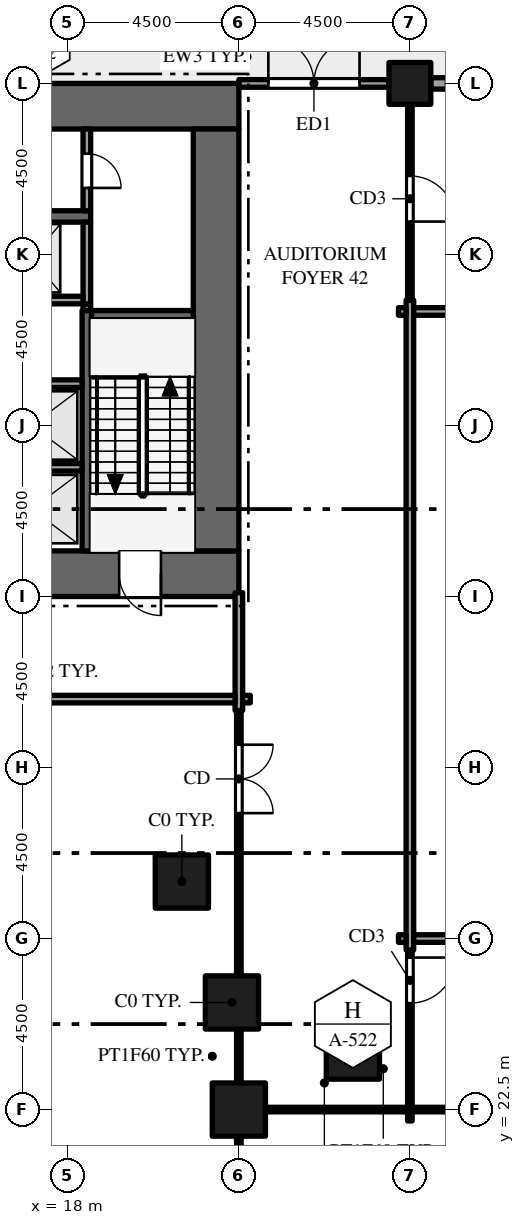
"""IFC4 building model, lengths in metres.
Left out: names, types, materials, properties, quantities, classifications, styles, units other than length and angle.
Written with IfcOpenShell. Run it as: python <this file> out.ifc"""

import sys

from ifc_helpers import new_model, si_unit, direction, frame, frame_2d, origin, origin_2d, place, context, subcontext, project, spatial, rectangle, hollow_rectangle, extrude, element, fill, save


model = new_model("IFC4")
c1 = context("Model", 3, precision=1e-05, world=origin(), true_north=direction((0.0, 1.0)))
c2 = subcontext(c1, "Body", "Model", "MODEL_VIEW")
j1 = project(units=[si_unit("LENGTHUNIT", "METRE"), si_unit("PLANEANGLEUNIT", "RADIAN")], contexts=[c1])
p1 = place(None, origin())
s1 = spatial("IfcSite", under=j1, at=p1, CompositionType="ELEMENT")
p2 = place(p1, origin())
s2 = spatial("IfcBuilding", under=s1, at=p2, CompositionType="ELEMENT")
p3 = place(p2, origin())
s3 = spatial("IfcBuildingStorey", under=s2, at=p3, CompositionType="ELEMENT", Elevation=0.0)
p4 = place(p3, frame((0.0, 36.6, -0.3), z_axis=(0.0, 0.0, 1.0), x_axis=(1.0, 0.0, 0.0)))
e1 = element("IfcWall", 1, at=p4, inside=s3, PredefinedType="SHEAR", context=c2, shape_type="SweptSolid", body=[
    extrude(rectangle(XDim=22.5, YDim=1.2, at=frame_2d((11.25, 0.0))), origin(), (0.0, 0.0, 1.0), 8.15),
])
p5 = place(p4, frame((7.1, 0.0, 0.3)))
e2 = element("IfcOpeningElement", 2, at=p5, cuts=e1, PredefinedType="OPENING", context=c2, shape_type="SweptSolid", body=[
    extrude(rectangle(XDim=1.8, YDim=2.1, at=frame_2d((0.9, 1.05))), frame((0.0, 0.61, 0.0), z_axis=(0.0, -1.0, 0.0), x_axis=(1.0, 0.0, 0.0)), (0.0, 0.0, 1.0), 1.22),
])
p6 = place(p4, frame((13.15, 0.0, 0.3)))
e3 = element("IfcOpeningElement", 3, at=p6, cuts=e1, PredefinedType="OPENING", context=c2, shape_type="SweptSolid", body=[
    extrude(rectangle(XDim=1.1, YDim=2.1, at=frame_2d((0.55, 1.05))), frame((0.0, 0.61, 0.0), z_axis=(0.0, -1.0, 0.0), x_axis=(1.0, 0.0, 0.0)), (0.0, 0.0, 1.0), 1.22),
])
p7 = place(p4, frame((2.15, 0.0, 0.3)))
e4 = element("IfcOpeningElement", 4, at=p7, cuts=e1, PredefinedType="OPENING", context=c2, shape_type="SweptSolid", body=[
    extrude(rectangle(XDim=1.1, YDim=2.1, at=frame_2d((0.55, 1.05))), frame((0.0, 0.61, 0.0), z_axis=(0.0, -1.0, 0.0), x_axis=(1.0, 0.0, 0.0)), (0.0, 0.0, 1.0), 1.22),
])
p8 = place(p4, frame((19.35, 0.0, 0.3)))
e5 = element("IfcOpeningElement", 5, at=p8, cuts=e1, PredefinedType="OPENING", context=c2, shape_type="SweptSolid", body=[
    extrude(rectangle(XDim=1.1, YDim=2.1, at=frame_2d((0.55, 1.05))), frame((0.0, 0.61, 0.0), z_axis=(0.0, -1.0, 0.0), x_axis=(1.0, 0.0, 0.0)), (0.0, 0.0, 1.0), 1.22),
])
p9 = place(p3, frame((0.0, 48.9, -0.3), z_axis=(0.0, 0.0, 1.0), x_axis=(1.0, 0.0, 0.0)))
e6 = element("IfcWall", 6, at=p9, inside=s3, PredefinedType="SHEAR", context=c2, shape_type="SweptSolid", body=[
    extrude(rectangle(XDim=22.5, YDim=1.2, at=frame_2d((11.25, 0.0))), origin(), (0.0, 0.0, 1.0), 8.15),
])
p10 = place(p3, frame((21.9, 37.2, -0.3), z_axis=(0.0, 0.0, 1.0), x_axis=(0.0, 1.0, 0.0)))
e7 = element("IfcWall", 7, at=p10, inside=s3, PredefinedType="SHEAR", context=c2, shape_type="SweptSolid", body=[
    extrude(rectangle(XDim=11.1, YDim=1.2, at=frame_2d((5.55, 0.0))), origin(), (0.0, 0.0, 1.0), 8.15),
])
for number, where, z_axis, x_axis in (
    (8, (21.0, 28.5, -0.3), (0.0, 0.0, 1.0), (1.0, 0.0, 0.0)),
    (9, (22.318, 25.318, -0.3), (0.0, 0.0, 1.0), (1.0, 0.0, 0.0)),
    (10, (22.5, 22.5, -0.3), (0.0, 0.0, 1.0), (1.0, 0.0, 0.0)),
    (11, (25.5, 24.0, -0.3), (0.0, 0.0, 1.0), (1.0, 0.0, 0.0)),
):
    element("IfcColumn", number, at=place(p3, frame(where, z_axis=z_axis, x_axis=x_axis)), inside=s3, PredefinedType="COLUMN", context=c2, shape_type="SweptSolid", body=[
        extrude(hollow_rectangle(XDim=1.4, YDim=1.4, WallThickness=0.08, at=origin_2d()), origin(), (0.0, 0.0, 1.0), 8.05),
    ])
p11 = place(p3, frame((27.0, 49.5, -0.3), z_axis=(0.0, 0.0, 1.0), x_axis=(1.0, 0.0, 0.0)))
e12 = element("IfcColumn", 12, at=p11, inside=s3, PredefinedType="COLUMN", context=c2, shape_type="SweptSolid", body=[
    extrude(hollow_rectangle(XDim=1.1, YDim=1.1, WallThickness=0.06, at=origin_2d()), origin(), (0.0, 0.0, 1.0), 8.05),
])
p12 = place(p3, frame((30.95, 49.5, 0.0), z_axis=(0.0, 0.0, 1.0), x_axis=(-1.0, 0.0, 0.0)))
e13 = element("IfcWall", 13, at=p12, inside=s3, PredefinedType="STANDARD", context=c2, shape_type="SweptSolid", body=[
    extrude(rectangle(XDim=3.4, YDim=0.3, at=frame_2d((1.7, 0.0))), origin(), (0.0, 0.0, 1.0), 7.036),
])
p13 = place(p12, frame((0.4, 0.0, 0.9)))
e14 = element("IfcOpeningElement", 14, at=p13, cuts=e13, PredefinedType="OPENING", context=c2, shape_type="SweptSolid", body=[
    extrude(rectangle(XDim=1.0, YDim=3.5, at=frame_2d((0.5, 1.75))), frame((0.0, 0.16, 0.0), z_axis=(0.0, -1.0, 0.0), x_axis=(1.0, 0.0, 0.0)), (0.0, 0.0, 1.0), 0.32),
])
p14 = place(p12, frame((2.0, 0.0, 0.9)))
e15 = element("IfcOpeningElement", 15, at=p14, cuts=e13, PredefinedType="OPENING", context=c2, shape_type="SweptSolid", body=[
    extrude(rectangle(XDim=1.0, YDim=3.5, at=frame_2d((0.5, 1.75))), frame((0.0, 0.16, 0.0), z_axis=(0.0, -1.0, 0.0), x_axis=(1.0, 0.0, 0.0)), (0.0, 0.0, 1.0), 0.32),
])
p15 = place(p3, frame((22.501, 49.5, 0.0), z_axis=(0.0, 0.0, 1.0), x_axis=(1.0, 0.0, 0.0)))
e16 = element("IfcWall", 16, at=p15, inside=s3, PredefinedType="STANDARD", context=c2, shape_type="SweptSolid", body=[
    extrude(rectangle(XDim=3.949, YDim=0.2, at=frame_2d((1.975, 0.0))), origin(), (0.0, 0.0, 1.0), 7.036),
])
p16 = place(p15, frame((0.774, 0.0, 0.0)))
e17 = element("IfcOpeningElement", 17, at=p16, cuts=e16, PredefinedType="OPENING", context=c2, shape_type="SweptSolid", body=[
    extrude(rectangle(XDim=2.4, YDim=3.0, at=frame_2d((1.2, 1.5))), frame((0.0, 0.11, 0.0), z_axis=(0.0, -1.0, 0.0), x_axis=(1.0, 0.0, 0.0)), (0.0, 0.0, 1.0), 0.22),
])
p17 = place(p3, frame((18.5, 37.2, 0.0), z_axis=(0.0, 0.0, 1.0), x_axis=(0.0, 1.0, 0.0)))
e18 = element("IfcWall", 18, at=p17, inside=s3, PredefinedType="SHEAR", context=c2, shape_type="SweptSolid", body=[
    extrude(rectangle(XDim=6.325, YDim=0.25, at=frame_2d((3.163, 0.0))), origin(), (0.0, 0.0, 1.0), 7.75),
])
p18 = place(p3, frame((18.5, 43.525, 0.0), z_axis=(0.0, 0.0, 1.0), x_axis=(0.0, 1.0, 0.0)))
e19 = element("IfcWall", 19, at=p18, inside=s3, PredefinedType="PARTITIONING", context=c2, shape_type="SweptSolid", body=[
    extrude(rectangle(XDim=0.175, YDim=0.2, at=frame_2d((0.087, 0.0))), origin(), (0.0, 0.0, 1.0), 7.75),
])
p19 = place(p3, frame((18.5, 43.7, 0.0), z_axis=(0.0, 0.0, 1.0), x_axis=(0.0, 1.0, 0.0)))
e20 = element("IfcWall", 20, at=p19, inside=s3, PredefinedType="SOLIDWALL", context=c2, shape_type="SweptSolid", body=[
    extrude(rectangle(XDim=2.15, YDim=0.2, at=frame_2d((1.075, 0.0))), origin(), (0.0, 0.0, 1.0), 7.75),
])
p20 = place(p3, frame((18.5, 46.15, 0.0), z_axis=(0.0, 0.0, 1.0), x_axis=(0.0, 1.0, 0.0)))
e21 = element("IfcWall", 21, at=p20, inside=s3, PredefinedType="PARTITIONING", context=c2, shape_type="SweptSolid", body=[
    extrude(rectangle(XDim=2.15, YDim=0.2, at=frame_2d((1.075, 0.0))), origin(), (0.0, 0.0, 1.0), 7.75),
])
p21 = place(p20, frame((0.6, 0.0, 0.0)))
e22 = element("IfcOpeningElement", 22, at=p21, cuts=e21, PredefinedType="OPENING", context=c2, shape_type="SweptSolid", body=[
    extrude(rectangle(XDim=0.9, YDim=2.1, at=frame_2d((0.45, 1.05))), frame((0.0, 0.11, 0.0), z_axis=(0.0, -1.0, 0.0), x_axis=(1.0, 0.0, 0.0)), (0.0, 0.0, 1.0), 0.22),
])
p22 = place(p3, frame((22.5, 0.15, 0.0), z_axis=(0.0, 0.0, 1.0), x_axis=(0.0, 1.0, 0.0)))
e23 = element("IfcWall", 23, at=p22, inside=s3, PredefinedType="PARTITIONING", context=c2, shape_type="SweptSolid", body=[
    extrude(rectangle(XDim=32.85, YDim=0.12, at=frame_2d((16.425, 0.0))), origin(), (0.0, 0.0, 1.0), 6.759),
])
p23 = place(p22, frame((5.35, 0.0, 0.0)))
e24 = element("IfcOpeningElement", 24, at=p23, cuts=e23, PredefinedType="OPENING", context=c2, shape_type="SweptSolid", body=[
    extrude(rectangle(XDim=1.2, YDim=2.1, at=frame_2d((0.6, 1.05))), frame((0.0, 0.07, 0.0), z_axis=(0.0, -1.0, 0.0), x_axis=(1.0, 0.0, 0.0)), (0.0, 0.0, 1.0), 0.14),
])
p24 = place(p22, frame((16.155, 0.0, 0.0)))
e25 = element("IfcOpeningElement", 25, at=p24, cuts=e23, PredefinedType="OPENING", context=c2, shape_type="SweptSolid", body=[
    extrude(rectangle(XDim=1.2, YDim=2.1, at=frame_2d((0.6, 1.05))), frame((0.0, 0.07, 0.0), z_axis=(0.0, -1.0, 0.0), x_axis=(1.0, 0.0, 0.0)), (0.0, 0.0, 1.0), 0.14),
])
p25 = place(p22, frame((30.15, 0.0, 0.0)))
e26 = element("IfcOpeningElement", 26, at=p25, cuts=e23, PredefinedType="OPENING", context=c2, shape_type="SweptSolid", body=[
    extrude(rectangle(XDim=1.8, YDim=2.1, at=frame_2d((0.9, 1.05))), frame((0.0, 0.07, 0.0), z_axis=(0.0, -1.0, 0.0), x_axis=(1.0, 0.0, 0.0)), (0.0, 0.0, 1.0), 0.14),
])
p26 = place(p3, frame((22.5, 33.0, 0.0), z_axis=(0.0, 0.0, 1.0), x_axis=(0.0, 1.0, 0.0)))
e27 = element("IfcWall", 27, at=p26, inside=s3, PredefinedType="PARTITIONING", context=c2, shape_type="SweptSolid", body=[
    extrude(rectangle(XDim=3.1, YDim=0.2, at=frame_2d((1.55, 0.0))), origin(), (0.0, 0.0, 1.0), 6.759),
])
p27 = place(p3, frame((27.0, 22.2, 0.0), z_axis=(0.0, 0.0, 1.0), x_axis=(0.0, 1.0, 0.0)))
e28 = element("IfcWall", 28, at=p27, inside=s3, PredefinedType="PARTITIONING", context=c2, shape_type="SweptSolid", body=[
    extrude(rectangle(XDim=4.5, YDim=0.12, at=frame_2d((2.25, 0.0))), origin(), (0.0, 0.0, 1.0), 6.5),
])
p28 = place(p27, frame((3.1, 0.0, 0.0)))
e29 = element("IfcOpeningElement", 29, at=p28, cuts=e28, PredefinedType="OPENING", context=c2, shape_type="SweptSolid", body=[
    extrude(rectangle(XDim=1.2, YDim=2.1, at=frame_2d((0.6, 1.05))), frame((0.0, 0.07, 0.0), z_axis=(0.0, -1.0, 0.0), x_axis=(1.0, 0.0, 0.0)), (0.0, 0.0, 1.0), 0.14),
])
p29 = place(p3, frame((27.0, 26.7, 0.0), z_axis=(0.0, 0.0, 1.0), x_axis=(0.0, 1.0, 0.0)))
e30 = element("IfcWall", 30, at=p29, inside=s3, PredefinedType="PARTITIONING", context=c2, shape_type="SweptSolid", body=[
    extrude(rectangle(XDim=17.1, YDim=0.2, at=frame_2d((8.55, 0.0))), origin(), (0.0, 0.0, 1.0), 6.66),
])
p30 = place(p3, frame((27.0, 43.8, 0.0), z_axis=(0.0, 0.0, 1.0), x_axis=(0.0, 1.0, 0.0)))
e31 = element("IfcWall", 31, at=p30, inside=s3, PredefinedType="PARTITIONING", context=c2, shape_type="SweptSolid", body=[
    extrude(rectangle(XDim=5.55, YDim=0.12, at=frame_2d((2.775, 0.0))), origin(), (0.0, 0.0, 1.0), 6.66),
])
p31 = place(p30, frame((2.065, 0.0, 0.0)))
e32 = element("IfcOpeningElement", 32, at=p31, cuts=e31, PredefinedType="OPENING", context=c2, shape_type="SweptSolid", body=[
    extrude(rectangle(XDim=1.2, YDim=2.1, at=frame_2d((0.6, 1.05))), frame((0.0, 0.07, 0.0), z_axis=(0.0, -1.0, 0.0), x_axis=(1.0, 0.0, 0.0)), (0.0, 0.0, 1.0), 0.14),
])
p32 = place(p3, frame((22.2, 22.5, 0.0), z_axis=(0.0, 0.0, 1.0), x_axis=(1.0, 0.0, 0.0)))
e33 = element("IfcWall", 33, at=p32, inside=s3, PredefinedType="PARTITIONING", context=c2, shape_type="SweptSolid", body=[
    extrude(rectangle(XDim=0.24, YDim=0.12, at=frame_2d((0.12, 0.0))), origin(), (0.0, 0.0, 1.0), 7.75),
])
p33 = place(p3, frame((22.56, 22.5, 0.0), z_axis=(0.0, 0.0, 1.0), x_axis=(1.0, 0.0, 0.0)))
e34 = element("IfcWall", 34, at=p33, inside=s3, PredefinedType="PARTITIONING", context=c2, shape_type="SweptSolid", body=[
    extrude(rectangle(XDim=4.38, YDim=0.12, at=frame_2d((2.19, 0.0))), origin(), (0.0, 0.0, 1.0), 6.66),
])
p34 = place(p3, frame((27.06, 22.5, 0.0), z_axis=(0.0, 0.0, 1.0), x_axis=(1.0, 0.0, 0.0)))
e35 = element("IfcWall", 35, at=p34, inside=s3, PredefinedType="PARTITIONING", context=c2, shape_type="SweptSolid", body=[
    extrude(rectangle(XDim=4.14, YDim=0.12, at=frame_2d((2.07, 0.0))), origin(), (0.0, 0.0, 1.0), 6.66),
])
p35 = place(p3, frame((26.7, 27.0, 0.0), z_axis=(0.0, 0.0, 1.0), x_axis=(1.0, 0.0, 0.0)))
e36 = element("IfcWall", 36, at=p35, inside=s3, PredefinedType="PARTITIONING", context=c2, shape_type="SweptSolid", body=[
    extrude(rectangle(XDim=0.2, YDim=0.2, at=frame_2d((0.1, 0.0))), origin(), (0.0, 0.0, 1.0), 6.66),
])
p36 = place(p3, frame((27.1, 27.0, 0.0), z_axis=(0.0, 0.0, 1.0), x_axis=(1.0, 0.0, 0.0)))
e37 = element("IfcWall", 37, at=p36, inside=s3, PredefinedType="PARTITIONING", context=c2, shape_type="SweptSolid", body=[
    extrude(rectangle(XDim=26.8, YDim=0.2, at=frame_2d((13.4, 0.0))), origin(), (0.0, 0.0, 1.0), 6.66),
])
p37 = place(p36, frame((12.5, 0.0, 0.0)))
e38 = element("IfcOpeningElement", 38, at=p37, cuts=e37, PredefinedType="OPENING", context=c2, shape_type="SweptSolid", body=[
    extrude(rectangle(XDim=1.8, YDim=2.1, at=frame_2d((0.9, 1.05))), frame((0.0, 0.11, 0.0), z_axis=(0.0, -1.0, 0.0), x_axis=(1.0, 0.0, 0.0)), (0.0, 0.0, 1.0), 0.22),
])
p38 = place(p36, frame((14.5, 0.0, 0.0)))
e39 = element("IfcOpeningElement", 39, at=p38, cuts=e37, PredefinedType="OPENING", context=c2, shape_type="SweptSolid", body=[
    extrude(rectangle(XDim=1.8, YDim=2.1, at=frame_2d((0.9, 1.05))), frame((0.0, 0.11, 0.0), z_axis=(0.0, -1.0, 0.0), x_axis=(1.0, 0.0, 0.0)), (0.0, 0.0, 1.0), 0.22),
])
p39 = place(p3, frame((0.15, 33.3, 0.0), z_axis=(0.0, 0.0, 1.0), x_axis=(1.0, 0.0, 0.0)))
e40 = element("IfcWall", 40, at=p39, inside=s3, PredefinedType="PARTITIONING", context=c2, shape_type="SweptSolid", body=[
    extrude(rectangle(XDim=22.25, YDim=0.2, at=frame_2d((11.125, 0.0))), origin(), (0.0, 0.0, 1.0), 6.5),
])
p40 = place(p39, frame((9.7, 0.0, 0.0)))
e41 = element("IfcOpeningElement", 41, at=p40, cuts=e40, PredefinedType="OPENING", context=c2, shape_type="SweptSolid", body=[
    extrude(rectangle(XDim=1.8, YDim=2.1, at=frame_2d((0.9, 1.05))), frame((0.0, 0.11, 0.0), z_axis=(0.0, -1.0, 0.0), x_axis=(1.0, 0.0, 0.0)), (0.0, 0.0, 1.0), 0.22),
])
p41 = place(p3, frame((22.6, 33.3, 0.0), z_axis=(0.0, 0.0, 1.0), x_axis=(1.0, 0.0, 0.0)))
e42 = element("IfcWall", 42, at=p41, inside=s3, PredefinedType="PARTITIONING", context=c2, shape_type="SweptSolid", body=[
    extrude(rectangle(XDim=0.2, YDim=0.2, at=frame_2d((0.1, 0.0))), origin(), (0.0, 0.0, 1.0), 6.759),
])
for number, where, z_axis, x_axis in (
    (43, (15.7, 39.4, 0.0), (0.0, 0.0, 1.0), (1.0, 0.0, 0.0)),
    (44, (15.7, 41.6, 0.0), (0.0, 0.0, 1.0), (1.0, 0.0, 0.0)),
):
    element("IfcWall", number, at=place(p3, frame(where, z_axis=z_axis, x_axis=x_axis)), inside=s3, PredefinedType="SOLIDWALL", context=c2, shape_type="SweptSolid", body=[
        extrude(rectangle(XDim=2.675, YDim=0.2, at=frame_2d((1.337, 0.0))), origin(), (0.0, 0.0, 1.0), 7.75),
    ])
p42 = place(p3, frame((18.625, 43.4, 0.0), z_axis=(0.0, 0.0, 1.0), x_axis=(1.0, 0.0, 0.0)))
e45 = element("IfcWall", 45, at=p42, inside=s3, PredefinedType="SHEAR", context=c2, shape_type="SweptSolid", body=[
    extrude(rectangle(XDim=2.675, YDim=0.25, at=frame_2d((1.337, 0.0))), origin(), (0.0, 0.0, 1.0), 7.75),
])
p43 = place(p3, frame((26.7, 43.5, 0.0), z_axis=(0.0, 0.0, 1.0), x_axis=(1.0, 0.0, 0.0)))
e46 = element("IfcWall", 46, at=p43, inside=s3, PredefinedType="PARTITIONING", context=c2, shape_type="SweptSolid", body=[
    extrude(rectangle(XDim=0.2, YDim=0.2, at=frame_2d((0.1, 0.0))), origin(), (0.0, 0.0, 1.0), 6.66),
])
p44 = place(p3, frame((27.1, 43.5, 0.0), z_axis=(0.0, 0.0, 1.0), x_axis=(1.0, 0.0, 0.0)))
e47 = element("IfcWall", 47, at=p44, inside=s3, PredefinedType="PARTITIONING", context=c2, shape_type="SweptSolid", body=[
    extrude(rectangle(XDim=26.8, YDim=0.2, at=frame_2d((13.4, 0.0))), origin(), (0.0, 0.0, 1.0), 6.66),
])
p45 = place(p44, frame((12.5, 0.0, 0.0)))
e48 = element("IfcOpeningElement", 48, at=p45, cuts=e47, PredefinedType="OPENING", context=c2, shape_type="SweptSolid", body=[
    extrude(rectangle(XDim=1.8, YDim=2.1, at=frame_2d((0.9, 1.05))), frame((0.0, 0.11, 0.0), z_axis=(0.0, -1.0, 0.0), x_axis=(1.0, 0.0, 0.0)), (0.0, 0.0, 1.0), 0.22),
])
p46 = place(p3, frame((15.7, 43.8, 0.0), z_axis=(0.0, 0.0, 1.0), x_axis=(1.0, 0.0, 0.0)))
e49 = element("IfcWall", 49, at=p46, inside=s3, PredefinedType="SOLIDWALL", context=c2, shape_type="SweptSolid", body=[
    extrude(rectangle(XDim=2.7, YDim=0.2, at=frame_2d((1.35, 0.0))), origin(), (0.0, 0.0, 1.0), 7.75),
])
p47 = place(p3, frame((4.1, 46.0, 0.0), z_axis=(0.0, 0.0, 1.0), x_axis=(1.0, 0.0, 0.0)))
e50 = element("IfcWall", 50, at=p47, inside=s3, PredefinedType="SHEAR", context=c2, shape_type="SweptSolid", body=[
    extrude(rectangle(XDim=14.5, YDim=0.3, at=frame_2d((7.25, 0.0))), origin(), (0.0, 0.0, 1.0), 7.75),
])
p48 = place(p47, frame((3.4, 0.0, 0.0)))
e51 = element("IfcOpeningElement", 51, at=p48, cuts=e50, PredefinedType="OPENING", context=c2, shape_type="SweptSolid", body=[
    extrude(rectangle(XDim=1.0, YDim=2.1, at=frame_2d((0.5, 1.05))), frame((0.0, 0.16, 0.0), z_axis=(0.0, -1.0, 0.0), x_axis=(1.0, 0.0, 0.0)), (0.0, 0.0, 1.0), 0.32),
])
p49 = place(p47, frame((9.1, 0.0, 0.0)))
e52 = element("IfcOpeningElement", 52, at=p49, cuts=e50, PredefinedType="OPENING", context=c2, shape_type="SweptSolid", body=[
    extrude(rectangle(XDim=1.0, YDim=2.1, at=frame_2d((0.5, 1.05))), frame((0.0, 0.16, 0.0), z_axis=(0.0, -1.0, 0.0), x_axis=(1.0, 0.0, 0.0)), (0.0, 0.0, 1.0), 0.32),
])
p50 = place(p16, origin())
e53 = element("IfcDoor", 53, at=p50, inside=s3, OperationType="DOUBLE_DOOR_SINGLE_SWING", PredefinedType="DOOR", context=c2, shape_type="SweptSolid", body=[
    extrude(rectangle(XDim=2.4, YDim=3.0, at=frame_2d((1.2, 1.5))), frame((0.0, 0.025, 0.0), z_axis=(0.0, -1.0, 0.0), x_axis=(1.0, 0.0, 0.0)), (0.0, 0.0, 1.0), 0.05),
])
fill(e17, e53)
p51 = place(p8, origin())
e54 = element("IfcDoor", 54, at=p51, inside=s3, OperationType="SINGLE_SWING_RIGHT", PredefinedType="DOOR", context=c2, shape_type="SweptSolid", body=[
    extrude(rectangle(XDim=1.1, YDim=2.1, at=frame_2d((0.55, 1.05))), frame((0.0, 0.025, 0.0), z_axis=(0.0, -1.0, 0.0), x_axis=(1.0, 0.0, 0.0)), (0.0, 0.0, 1.0), 0.05),
])
fill(e5, e54)
p52 = place(p21, origin())
e55 = element("IfcDoor", 55, at=p52, inside=s3, OperationType="SINGLE_SWING_LEFT", PredefinedType="DOOR", context=c2, shape_type="SweptSolid", body=[
    extrude(rectangle(XDim=0.9, YDim=2.1, at=frame_2d((0.45, 1.05))), frame((0.0, 0.025, 0.0), z_axis=(0.0, -1.0, 0.0), x_axis=(1.0, 0.0, 0.0)), (0.0, 0.0, 1.0), 0.05),
])
fill(e22, e55)
p53 = place(p25, origin())
e56 = element("IfcDoor", 56, at=p53, inside=s3, OperationType="DOUBLE_DOOR_SINGLE_SWING", PredefinedType="DOOR", context=c2, shape_type="SweptSolid", body=[
    extrude(rectangle(XDim=1.8, YDim=2.1, at=frame_2d((0.9, 1.05))), frame((0.0, 0.025, 0.0), z_axis=(0.0, -1.0, 0.0), x_axis=(1.0, 0.0, 0.0)), (0.0, 0.0, 1.0), 0.05),
])
fill(e26, e56)
p54 = place(p28, origin())
e57 = element("IfcDoor", 57, at=p54, inside=s3, OperationType="SINGLE_SWING_RIGHT", PredefinedType="DOOR", context=c2, shape_type="SweptSolid", body=[
    extrude(rectangle(XDim=1.2, YDim=2.1, at=frame_2d((0.6, 1.05))), frame((0.0, 0.025, 0.0), z_axis=(0.0, -1.0, 0.0), x_axis=(1.0, 0.0, 0.0)), (0.0, 0.0, 1.0), 0.05),
])
fill(e29, e57)
p55 = place(p31, origin())
e58 = element("IfcDoor", 58, at=p55, inside=s3, OperationType="SINGLE_SWING_LEFT", PredefinedType="DOOR", context=c2, shape_type="SweptSolid", body=[
    extrude(rectangle(XDim=1.2, YDim=2.1, at=frame_2d((0.6, 1.05))), frame((0.0, 0.025, 0.0), z_axis=(0.0, -1.0, 0.0), x_axis=(1.0, 0.0, 0.0)), (0.0, 0.0, 1.0), 0.05),
])
fill(e32, e58)
save(model, sys.argv[1])
